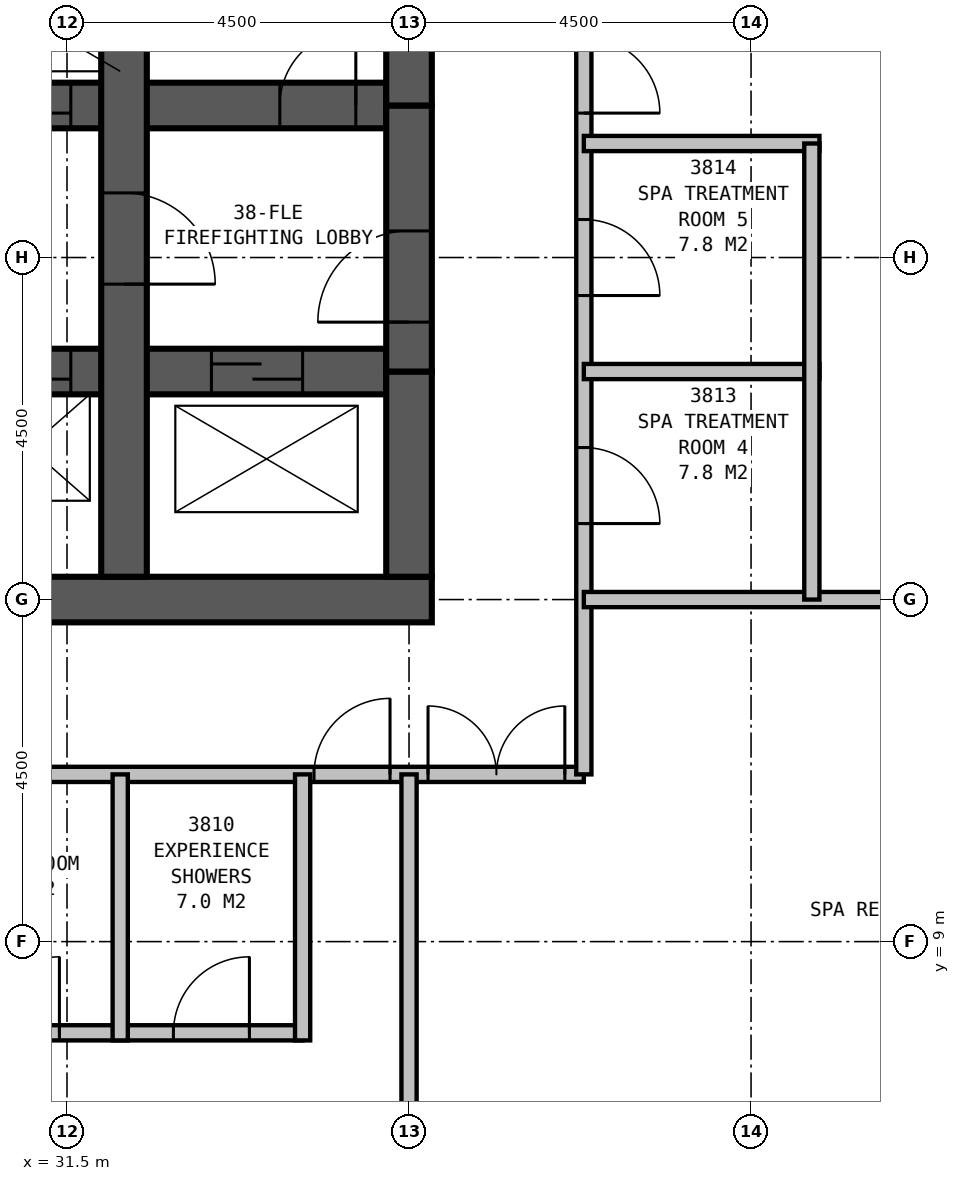
"""IFC4 building model, lengths in metres.
Left out: names, types, materials, properties, quantities, classifications, styles, units other than length and angle.
Written with IfcOpenShell. Run it as: python <this file> out.ifc"""

import sys

from ifc_helpers import new_model, si_unit, direction, frame, frame_2d, origin, place, context, subcontext, project, spatial, rectangle, extrude, element, fill, save


model = new_model("IFC4")
c1 = context("Model", 3, precision=1e-05, world=origin(), true_north=direction((0.0, 1.0)))
c2 = subcontext(c1, "Body", "Model", "MODEL_VIEW")
j1 = project(units=[si_unit("LENGTHUNIT", "METRE"), si_unit("PLANEANGLEUNIT", "RADIAN")], contexts=[c1])
p1 = place(None, origin())
s1 = spatial("IfcSite", under=j1, at=p1, CompositionType="ELEMENT")
p2 = place(p1, origin())
s2 = spatial("IfcBuilding", under=s1, at=p2, CompositionType="ELEMENT")
p3 = place(p2, frame((0.0, 0.0, 145.9)))
s3 = spatial("IfcBuildingStorey", under=s2, at=p3, CompositionType="ELEMENT", Elevation=145.9)
p4 = place(p3, frame((13.2, 13.5, 0.0), z_axis=(0.0, 0.0, 1.0), x_axis=(1.0, 0.0, 0.0)))
e1 = element("IfcWall", 1, at=p4, inside=s3, PredefinedType="SHEAR", context=c2, shape_type="SweptSolid", body=[
    extrude(rectangle(XDim=23.1, YDim=0.6, at=frame_2d((11.55, 0.0))), origin(), (0.0, 0.0, 1.0), 6.0),
])
p5 = place(p3, frame((32.25, 13.8, 0.0), z_axis=(0.0, 0.0, 1.0), x_axis=(0.0, 1.0, 0.0)))
e2 = element("IfcWall", 2, at=p5, inside=s3, PredefinedType="SHEAR", context=c2, shape_type="SweptSolid", body=[
    extrude(rectangle(XDim=12.9, YDim=0.6, at=frame_2d((6.45, 0.0))), origin(), (0.0, 0.0, 1.0), 6.0),
])
p6 = place(p5, frame((5.05, 0.0, 0.0), z_axis=(0.0, 0.0, 1.0), x_axis=(-1.0, 0.0, 0.0)))
e3 = element("IfcOpeningElement", 3, at=p6, cuts=e2, PredefinedType="OPENING", context=c2, shape_type="SweptSolid", body=[
    extrude(rectangle(XDim=1.2, YDim=2.1, at=frame_2d((0.6, 1.05))), frame((0.0, 0.31, 0.0), z_axis=(0.0, -1.0, 0.0), x_axis=(1.0, 0.0, 0.0)), (0.0, 0.0, 1.0), 0.62),
])
p7 = place(p3, frame((13.8, 16.5, 0.0), z_axis=(0.0, 0.0, 1.0), x_axis=(1.0, 0.0, 0.0)))
e4 = element("IfcWall", 4, at=p7, inside=s3, PredefinedType="SHEAR", context=c2, shape_type="SweptSolid", body=[
    extrude(rectangle(XDim=21.9, YDim=0.6, at=frame_2d((10.95, 0.0))), origin(), (0.0, 0.0, 1.0), 6.0),
])
p8 = place(p7, frame((11.65, 0.0, 0.0)))
e5 = element("IfcOpeningElement", 5, at=p8, cuts=e4, PredefinedType="OPENING", context=c2, shape_type="SweptSolid", body=[
    extrude(rectangle(XDim=1.1, YDim=2.1, at=frame_2d((0.55, 1.05))), frame((0.0, 0.31, 0.0), z_axis=(0.0, -1.0, 0.0), x_axis=(1.0, 0.0, 0.0)), (0.0, 0.0, 1.0), 0.62),
])
p9 = place(p7, frame((14.15, 0.0, 0.0)))
e6 = element("IfcOpeningElement", 6, at=p9, cuts=e4, PredefinedType="OPENING", context=c2, shape_type="SweptSolid", body=[
    extrude(rectangle(XDim=1.1, YDim=2.1, at=frame_2d((0.55, 1.05))), frame((0.0, 0.31, 0.0), z_axis=(0.0, -1.0, 0.0), x_axis=(1.0, 0.0, 0.0)), (0.0, 0.0, 1.0), 0.62),
])
p10 = place(p7, frame((16.65, 0.0, 0.0)))
e7 = element("IfcOpeningElement", 7, at=p10, cuts=e4, PredefinedType="OPENING", context=c2, shape_type="SweptSolid", body=[
    extrude(rectangle(XDim=1.1, YDim=2.1, at=frame_2d((0.55, 1.05))), frame((0.0, 0.31, 0.0), z_axis=(0.0, -1.0, 0.0), x_axis=(1.0, 0.0, 0.0)), (0.0, 0.0, 1.0), 0.62),
])
p11 = place(p7, frame((5.75, 0.0, 0.0), z_axis=(0.0, 0.0, 1.0), x_axis=(-1.0, 0.0, 0.0)))
e8 = element("IfcOpeningElement", 8, at=p11, cuts=e4, PredefinedType="OPENING", context=c2, shape_type="SweptSolid", body=[
    extrude(rectangle(XDim=1.0, YDim=2.1, at=frame_2d((0.5, 1.05))), frame((0.0, 0.31, 0.0), z_axis=(0.0, -1.0, 0.0), x_axis=(1.0, 0.0, 0.0)), (0.0, 0.0, 1.0), 0.62),
])
p12 = place(p7, frame((10.2, 0.0, 0.0), z_axis=(0.0, 0.0, 1.0), x_axis=(-1.0, 0.0, 0.0)))
e9 = element("IfcOpeningElement", 9, at=p12, cuts=e4, PredefinedType="OPENING", context=c2, shape_type="SweptSolid", body=[
    extrude(rectangle(XDim=1.0, YDim=2.1, at=frame_2d((0.5, 1.05))), frame((0.0, 0.31, 0.0), z_axis=(0.0, -1.0, 0.0), x_axis=(1.0, 0.0, 0.0)), (0.0, 0.0, 1.0), 0.62),
])
p13 = place(p7, frame((0.6, 0.0, 0.0)))
e10 = element("IfcOpeningElement", 10, at=p13, cuts=e4, PredefinedType="OPENING", context=c2, shape_type="SweptSolid", body=[
    extrude(rectangle(XDim=1.2, YDim=2.1, at=frame_2d((0.6, 1.05))), frame((0.0, 0.31, 0.0), z_axis=(0.0, -1.0, 0.0), x_axis=(1.0, 0.0, 0.0)), (0.0, 0.0, 1.0), 0.62),
])
p14 = place(p7, frame((19.6, 0.0, 0.0)))
e11 = element("IfcOpeningElement", 11, at=p14, cuts=e4, PredefinedType="OPENING", context=c2, shape_type="SweptSolid", body=[
    extrude(rectangle(XDim=1.2, YDim=2.1, at=frame_2d((0.6, 1.05))), frame((0.0, 0.31, 0.0), z_axis=(0.0, -1.0, 0.0), x_axis=(1.0, 0.0, 0.0)), (0.0, 0.0, 1.0), 0.62),
])
p15 = place(p3, frame((13.8, 20.0, 0.0), z_axis=(0.0, 0.0, 1.0), x_axis=(1.0, 0.0, 0.0)))
e12 = element("IfcWall", 12, at=p15, inside=s3, PredefinedType="SHEAR", context=c2, shape_type="SweptSolid", body=[
    extrude(rectangle(XDim=21.9, YDim=0.6, at=frame_2d((10.95, 0.0))), origin(), (0.0, 0.0, 1.0), 6.0),
])
p16 = place(p15, frame((0.5, 0.0, 0.0)))
e13 = element("IfcOpeningElement", 13, at=p16, cuts=e12, PredefinedType="OPENING", context=c2, shape_type="SweptSolid", body=[
    extrude(rectangle(XDim=1.0, YDim=2.1, at=frame_2d((0.5, 1.05))), frame((0.0, 0.31, 0.0), z_axis=(0.0, -1.0, 0.0), x_axis=(1.0, 0.0, 0.0)), (0.0, 0.0, 1.0), 0.62),
])
p17 = place(p15, frame((20.5, 0.0, 0.0)))
e14 = element("IfcOpeningElement", 14, at=p17, cuts=e12, PredefinedType="OPENING", context=c2, shape_type="SweptSolid", body=[
    extrude(rectangle(XDim=1.0, YDim=2.1, at=frame_2d((0.5, 1.05))), frame((0.0, 0.31, 0.0), z_axis=(0.0, -1.0, 0.0), x_axis=(1.0, 0.0, 0.0)), (0.0, 0.0, 1.0), 0.62),
])
p18 = place(p15, frame((4.15, 0.0, 0.0)))
e15 = element("IfcOpeningElement", 15, at=p18, cuts=e12, PredefinedType="OPENING", context=c2, shape_type="SweptSolid", body=[
    extrude(rectangle(XDim=1.1, YDim=2.1, at=frame_2d((0.55, 1.05))), frame((0.0, 0.31, 0.0), z_axis=(0.0, -1.0, 0.0), x_axis=(1.0, 0.0, 0.0)), (0.0, 0.0, 1.0), 0.62),
])
p19 = place(p15, frame((6.65, 0.0, 0.0)))
e16 = element("IfcOpeningElement", 16, at=p19, cuts=e12, PredefinedType="OPENING", context=c2, shape_type="SweptSolid", body=[
    extrude(rectangle(XDim=1.1, YDim=2.1, at=frame_2d((0.55, 1.05))), frame((0.0, 0.31, 0.0), z_axis=(0.0, -1.0, 0.0), x_axis=(1.0, 0.0, 0.0)), (0.0, 0.0, 1.0), 0.62),
])
p20 = place(p15, frame((9.15, 0.0, 0.0)))
e17 = element("IfcOpeningElement", 17, at=p20, cuts=e12, PredefinedType="OPENING", context=c2, shape_type="SweptSolid", body=[
    extrude(rectangle(XDim=1.1, YDim=2.1, at=frame_2d((0.55, 1.05))), frame((0.0, 0.31, 0.0), z_axis=(0.0, -1.0, 0.0), x_axis=(1.0, 0.0, 0.0)), (0.0, 0.0, 1.0), 0.62),
])
p21 = place(p15, frame((11.65, 0.0, 0.0)))
e18 = element("IfcOpeningElement", 18, at=p21, cuts=e12, PredefinedType="OPENING", context=c2, shape_type="SweptSolid", body=[
    extrude(rectangle(XDim=1.1, YDim=2.1, at=frame_2d((0.55, 1.05))), frame((0.0, 0.31, 0.0), z_axis=(0.0, -1.0, 0.0), x_axis=(1.0, 0.0, 0.0)), (0.0, 0.0, 1.0), 0.62),
])
p22 = place(p15, frame((14.15, 0.0, 0.0)))
e19 = element("IfcOpeningElement", 19, at=p22, cuts=e12, PredefinedType="OPENING", context=c2, shape_type="SweptSolid", body=[
    extrude(rectangle(XDim=1.1, YDim=2.1, at=frame_2d((0.55, 1.05))), frame((0.0, 0.31, 0.0), z_axis=(0.0, -1.0, 0.0), x_axis=(1.0, 0.0, 0.0)), (0.0, 0.0, 1.0), 0.62),
])
p23 = place(p15, frame((16.65, 0.0, 0.0)))
e20 = element("IfcOpeningElement", 20, at=p23, cuts=e12, PredefinedType="OPENING", context=c2, shape_type="SweptSolid", body=[
    extrude(rectangle(XDim=1.1, YDim=2.1, at=frame_2d((0.55, 1.05))), frame((0.0, 0.31, 0.0), z_axis=(0.0, -1.0, 0.0), x_axis=(1.0, 0.0, 0.0)), (0.0, 0.0, 1.0), 0.62),
])
p24 = place(p3, frame((36.0, 13.8, 0.0), z_axis=(0.0, 0.0, 1.0), x_axis=(0.0, 1.0, 0.0)))
e21 = element("IfcWall", 21, at=p24, inside=s3, PredefinedType="SHEAR", context=c2, shape_type="SweptSolid", body=[
    extrude(rectangle(XDim=2.7, YDim=0.6, at=frame_2d((1.35, 0.0))), origin(), (0.0, 0.0, 1.0), 6.0),
])
p25 = place(p3, frame((36.0, 16.5, 0.0), z_axis=(0.0, 0.0, 1.0), x_axis=(0.0, 1.0, 0.0)))
e22 = element("IfcWall", 22, at=p25, inside=s3, PredefinedType="SHEAR", context=c2, shape_type="SweptSolid", body=[
    extrude(rectangle(XDim=3.5, YDim=0.6, at=frame_2d((1.75, 0.0))), origin(), (0.0, 0.0, 1.0), 6.0),
])
p26 = place(p25, frame((0.65, 0.0, 0.0)))
e23 = element("IfcOpeningElement", 23, at=p26, cuts=e22, PredefinedType="OPENING", context=c2, shape_type="SweptSolid", body=[
    extrude(rectangle(XDim=1.2, YDim=2.1, at=frame_2d((0.6, 1.05))), frame((0.0, 0.31, 0.0), z_axis=(0.0, -1.0, 0.0), x_axis=(1.0, 0.0, 0.0)), (0.0, 0.0, 1.0), 0.62),
])
p27 = place(p3, frame((36.0, 20.0, 0.0), z_axis=(0.0, 0.0, 1.0), x_axis=(0.0, 1.0, 0.0)))
e24 = element("IfcWall", 24, at=p27, inside=s3, PredefinedType="SHEAR", context=c2, shape_type="SweptSolid", body=[
    extrude(rectangle(XDim=6.7, YDim=0.6, at=frame_2d((3.35, 0.0))), origin(), (0.0, 0.0, 1.0), 6.0),
])
p28 = place(p3, frame((11.2, 11.2, 0.0), z_axis=(0.0, 0.0, 1.0), x_axis=(1.0, 0.0, 0.0)))
e25 = element("IfcWall", 25, at=p28, inside=s3, PredefinedType="PARTITIONING", context=c2, shape_type="SweptSolid", body=[
    extrude(rectangle(XDim=27.1, YDim=0.2, at=frame_2d((13.55, 0.0))), origin(), (0.0, 0.0, 1.0), 5.7),
])
p29 = place(p28, frame((11.75, 0.0, 0.0)))
e26 = element("IfcOpeningElement", 26, at=p29, cuts=e25, PredefinedType="OPENING", context=c2, shape_type="SweptSolid", body=[
    extrude(rectangle(XDim=1.0, YDim=2.1, at=frame_2d((0.5, 1.05))), frame((0.0, 0.11, 0.0), z_axis=(0.0, -1.0, 0.0), x_axis=(1.0, 0.0, 0.0)), (0.0, 0.0, 1.0), 0.22),
])
p30 = place(p28, frame((23.55, 0.0, 0.0)))
e27 = element("IfcOpeningElement", 27, at=p30, cuts=e25, PredefinedType="OPENING", context=c2, shape_type="SweptSolid", body=[
    extrude(rectangle(XDim=1.0, YDim=2.1, at=frame_2d((0.5, 1.05))), frame((0.0, 0.11, 0.0), z_axis=(0.0, -1.0, 0.0), x_axis=(1.0, 0.0, 0.0)), (0.0, 0.0, 1.0), 0.22),
])
p31 = place(p28, frame((0.25, 0.0, 0.0)))
e28 = element("IfcOpeningElement", 28, at=p31, cuts=e25, PredefinedType="OPENING", context=c2, shape_type="SweptSolid", body=[
    extrude(rectangle(XDim=1.8, YDim=2.4, at=frame_2d((0.9, 1.2))), frame((0.0, 0.11, 0.0), z_axis=(0.0, -1.0, 0.0), x_axis=(1.0, 0.0, 0.0)), (0.0, 0.0, 1.0), 0.22),
])
p32 = place(p28, frame((25.05, 0.0, 0.0)))
e29 = element("IfcOpeningElement", 29, at=p32, cuts=e25, PredefinedType="OPENING", context=c2, shape_type="SweptSolid", body=[
    extrude(rectangle(XDim=1.8, YDim=2.4, at=frame_2d((0.9, 1.2))), frame((0.0, 0.11, 0.0), z_axis=(0.0, -1.0, 0.0), x_axis=(1.0, 0.0, 0.0)), (0.0, 0.0, 1.0), 0.22),
])
p33 = place(p3, frame((38.3, 11.2, 0.0), z_axis=(0.0, 0.0, 1.0), x_axis=(0.0, 1.0, 0.0)))
e30 = element("IfcWall", 30, at=p33, inside=s3, PredefinedType="PARTITIONING", context=c2, shape_type="SweptSolid", body=[
    extrude(rectangle(XDim=18.1, YDim=0.2, at=frame_2d((9.05, 0.0))), origin(), (0.0, 0.0, 1.0), 5.7),
])
p34 = place(p33, frame((4.3, 0.0, 0.0), z_axis=(0.0, 0.0, 1.0), x_axis=(-1.0, 0.0, 0.0)))
e31 = element("IfcOpeningElement", 31, at=p34, cuts=e30, PredefinedType="OPENING", context=c2, shape_type="SweptSolid", body=[
    extrude(rectangle(XDim=1.0, YDim=2.1, at=frame_2d((0.5, 1.05))), frame((0.0, 0.11, 0.0), z_axis=(0.0, -1.0, 0.0), x_axis=(1.0, 0.0, 0.0)), (0.0, 0.0, 1.0), 0.22),
])
p35 = place(p33, frame((7.3, 0.0, 0.0), z_axis=(0.0, 0.0, 1.0), x_axis=(-1.0, 0.0, 0.0)))
e32 = element("IfcOpeningElement", 32, at=p35, cuts=e30, PredefinedType="OPENING", context=c2, shape_type="SweptSolid", body=[
    extrude(rectangle(XDim=1.0, YDim=2.1, at=frame_2d((0.5, 1.05))), frame((0.0, 0.11, 0.0), z_axis=(0.0, -1.0, 0.0), x_axis=(1.0, 0.0, 0.0)), (0.0, 0.0, 1.0), 0.22),
])
p36 = place(p33, frame((9.7, 0.0, 0.0), z_axis=(0.0, 0.0, 1.0), x_axis=(-1.0, 0.0, 0.0)))
e33 = element("IfcOpeningElement", 33, at=p36, cuts=e30, PredefinedType="OPENING", context=c2, shape_type="SweptSolid", body=[
    extrude(rectangle(XDim=1.0, YDim=2.1, at=frame_2d((0.5, 1.05))), frame((0.0, 0.11, 0.0), z_axis=(0.0, -1.0, 0.0), x_axis=(1.0, 0.0, 0.0)), (0.0, 0.0, 1.0), 0.22),
])
p37 = place(p33, frame((12.75, 0.0, 0.0), z_axis=(0.0, 0.0, 1.0), x_axis=(-1.0, 0.0, 0.0)))
e34 = element("IfcOpeningElement", 34, at=p37, cuts=e30, PredefinedType="OPENING", context=c2, shape_type="SweptSolid", body=[
    extrude(rectangle(XDim=1.0, YDim=2.1, at=frame_2d((0.5, 1.05))), frame((0.0, 0.11, 0.0), z_axis=(0.0, -1.0, 0.0), x_axis=(1.0, 0.0, 0.0)), (0.0, 0.0, 1.0), 0.22),
])
p38 = place(p3, frame((36.0, 11.2, 0.0), z_axis=(0.0, 0.0, 1.0), x_axis=(0.0, -1.0, 0.0)))
e35 = element("IfcWall", 35, at=p38, inside=s3, PredefinedType="PARTITIONING", context=c2, shape_type="SweptSolid", body=[
    extrude(rectangle(XDim=10.15, YDim=0.2, at=frame_2d((5.075, 0.0))), origin(), (0.0, 0.0, 1.0), 4.7),
])
p39 = place(p3, frame((38.3, 13.5, 0.0), z_axis=(0.0, 0.0, 1.0), x_axis=(1.0, 0.0, 0.0)))
e36 = element("IfcWall", 36, at=p39, inside=s3, PredefinedType="PARTITIONING", context=c2, shape_type="SweptSolid", body=[
    extrude(rectangle(XDim=8.639, YDim=0.2, at=frame_2d((4.32, 0.0))), origin(), (0.0, 0.0, 1.0), 4.4),
])
p40 = place(p3, frame((32.2, 11.2, 0.0), z_axis=(0.0, 0.0, 1.0), x_axis=(0.0, -1.0, 0.0)))
e37 = element("IfcWall", 37, at=p40, inside=s3, PredefinedType="PARTITIONING", context=c2, shape_type="SweptSolid", body=[
    extrude(rectangle(XDim=3.5, YDim=0.2, at=frame_2d((1.75, 0.0))), origin(), (0.0, 0.0, 1.0), 4.7),
])
p41 = place(p3, frame((34.6, 11.2, 0.0), z_axis=(0.0, 0.0, 1.0), x_axis=(0.0, -1.0, 0.0)))
e38 = element("IfcWall", 38, at=p41, inside=s3, PredefinedType="PARTITIONING", context=c2, shape_type="SweptSolid", body=[
    extrude(rectangle(XDim=3.5, YDim=0.2, at=frame_2d((1.75, 0.0))), origin(), (0.0, 0.0, 1.0), 5.7),
])
p42 = place(p3, frame((27.0, 7.8, 0.0), z_axis=(0.0, 0.0, 1.0), x_axis=(1.0, 0.0, 0.0)))
e39 = element("IfcWall", 39, at=p42, inside=s3, PredefinedType="PARTITIONING", context=c2, shape_type="SweptSolid", body=[
    extrude(rectangle(XDim=7.6, YDim=0.2, at=frame_2d((3.8, 0.0))), origin(), (0.0, 0.0, 1.0), 5.7),
])
p43 = place(p42, frame((0.8, 0.0, 0.0)))
e40 = element("IfcOpeningElement", 40, at=p43, cuts=e39, PredefinedType="OPENING", context=c2, shape_type="SweptSolid", body=[
    extrude(rectangle(XDim=1.0, YDim=2.1, at=frame_2d((0.5, 1.05))), frame((0.0, 0.11, 0.0), z_axis=(0.0, -1.0, 0.0), x_axis=(1.0, 0.0, 0.0)), (0.0, 0.0, 1.0), 0.22),
])
p44 = place(p42, frame((3.4, 0.0, 0.0)))
e41 = element("IfcOpeningElement", 41, at=p44, cuts=e39, PredefinedType="OPENING", context=c2, shape_type="SweptSolid", body=[
    extrude(rectangle(XDim=1.0, YDim=2.1, at=frame_2d((0.5, 1.05))), frame((0.0, 0.11, 0.0), z_axis=(0.0, -1.0, 0.0), x_axis=(1.0, 0.0, 0.0)), (0.0, 0.0, 1.0), 0.22),
])
p45 = place(p42, frame((5.9, 0.0, 0.0)))
e42 = element("IfcOpeningElement", 42, at=p45, cuts=e39, PredefinedType="OPENING", context=c2, shape_type="SweptSolid", body=[
    extrude(rectangle(XDim=1.0, YDim=2.1, at=frame_2d((0.5, 1.05))), frame((0.0, 0.11, 0.0), z_axis=(0.0, -1.0, 0.0), x_axis=(1.0, 0.0, 0.0)), (0.0, 0.0, 1.0), 0.22),
])
for number, where, z_axis, x_axis in (
    (43, (38.3, 16.5, 0.0), (0.0, 0.0, 1.0), (1.0, 0.0, 0.0)),
    (44, (38.3, 19.5, 0.0), (0.0, 0.0, 1.0), (1.0, 0.0, 0.0)),
):
    element("IfcWall", number, at=place(p3, frame(where, z_axis=z_axis, x_axis=x_axis)), inside=s3, PredefinedType="PARTITIONING", context=c2, shape_type="SweptSolid", body=[
        extrude(rectangle(XDim=3.1, YDim=0.2, at=frame_2d((1.55, 0.0))), origin(), (0.0, 0.0, 1.0), 5.7),
    ])
p46 = place(p3, frame((41.3, 13.5, 0.0), z_axis=(0.0, 0.0, 1.0), x_axis=(0.0, 1.0, 0.0)))
e45 = element("IfcWall", 45, at=p46, inside=s3, PredefinedType="PARTITIONING", context=c2, shape_type="SweptSolid", body=[
    extrude(rectangle(XDim=6.0, YDim=0.2, at=frame_2d((3.0, 0.0))), origin(), (0.0, 0.0, 1.0), 5.7),
])
p47 = place(p30, origin())
e46 = element("IfcDoor", 46, at=p47, inside=s3, OperationType="SINGLE_SWING_RIGHT", PredefinedType="DOOR", context=c2, shape_type="SweptSolid", body=[
    extrude(rectangle(XDim=1.0, YDim=2.1, at=frame_2d((0.5, 1.05))), frame((0.0, 0.025, 0.0), z_axis=(0.0, -1.0, 0.0), x_axis=(1.0, 0.0, 0.0)), (0.0, 0.0, 1.0), 0.05),
])
fill(e27, e46)
p48 = place(p32, origin())
e47 = element("IfcDoor", 47, at=p48, inside=s3, OperationType="DOUBLE_DOOR_SINGLE_SWING", PredefinedType="DOOR", context=c2, shape_type="SweptSolid", body=[
    extrude(rectangle(XDim=1.8, YDim=2.4, at=frame_2d((0.9, 1.2))), frame((0.0, 0.025, 0.0), z_axis=(0.0, -1.0, 0.0), x_axis=(1.0, 0.0, 0.0)), (0.0, 0.0, 1.0), 0.05),
])
fill(e29, e47)
p49 = place(p34, origin())
e48 = element("IfcDoor", 48, at=p49, inside=s3, OperationType="SINGLE_SWING_RIGHT", PredefinedType="DOOR", context=c2, shape_type="SweptSolid", body=[
    extrude(rectangle(XDim=1.0, YDim=2.1, at=frame_2d((0.5, 1.05))), frame((0.0, 0.025, 0.0), z_axis=(0.0, -1.0, 0.0), x_axis=(1.0, 0.0, 0.0)), (0.0, 0.0, 1.0), 0.05),
])
fill(e31, e48)
p50 = place(p35, origin())
e49 = element("IfcDoor", 49, at=p50, inside=s3, OperationType="SINGLE_SWING_RIGHT", PredefinedType="DOOR", context=c2, shape_type="SweptSolid", body=[
    extrude(rectangle(XDim=1.0, YDim=2.1, at=frame_2d((0.5, 1.05))), frame((0.0, 0.025, 0.0), z_axis=(0.0, -1.0, 0.0), x_axis=(1.0, 0.0, 0.0)), (0.0, 0.0, 1.0), 0.05),
])
fill(e32, e49)
p51 = place(p36, origin())
e50 = element("IfcDoor", 50, at=p51, inside=s3, OperationType="SINGLE_SWING_RIGHT", PredefinedType="DOOR", context=c2, shape_type="SweptSolid", body=[
    extrude(rectangle(XDim=1.0, YDim=2.1, at=frame_2d((0.5, 1.05))), frame((0.0, 0.025, 0.0), z_axis=(0.0, -1.0, 0.0), x_axis=(1.0, 0.0, 0.0)), (0.0, 0.0, 1.0), 0.05),
])
fill(e33, e50)
p52 = place(p44, origin())
e51 = element("IfcDoor", 51, at=p52, inside=s3, OperationType="SINGLE_SWING_RIGHT", PredefinedType="DOOR", context=c2, shape_type="SweptSolid", body=[
    extrude(rectangle(XDim=1.0, YDim=2.1, at=frame_2d((0.5, 1.05))), frame((0.0, 0.025, 0.0), z_axis=(0.0, -1.0, 0.0), x_axis=(1.0, 0.0, 0.0)), (0.0, 0.0, 1.0), 0.05),
])
fill(e41, e51)
p53 = place(p45, origin())
e52 = element("IfcDoor", 52, at=p53, inside=s3, OperationType="SINGLE_SWING_RIGHT", PredefinedType="DOOR", context=c2, shape_type="SweptSolid", body=[
    extrude(rectangle(XDim=1.0, YDim=2.1, at=frame_2d((0.5, 1.05))), frame((0.0, 0.025, 0.0), z_axis=(0.0, -1.0, 0.0), x_axis=(1.0, 0.0, 0.0)), (0.0, 0.0, 1.0), 0.05),
])
fill(e42, e52)
p54 = place(p26, origin())
e53 = element("IfcDoor", 53, at=p54, inside=s3, OperationType="SINGLE_SWING_LEFT", PredefinedType="DOOR", context=c2, shape_type="SweptSolid", body=[
    extrude(rectangle(XDim=1.2, YDim=2.1, at=frame_2d((0.6, 1.05))), frame((0.0, 0.3, 0.0), z_axis=(0.0, -1.0, 0.0), x_axis=(1.0, 0.0, 0.0)), (0.0, 0.0, 1.0), 0.6),
])
fill(e23, e53)
p55 = place(p6, origin())
e54 = element("IfcDoor", 54, at=p55, inside=s3, OperationType="SINGLE_SWING_RIGHT", PredefinedType="DOOR", context=c2, shape_type="SweptSolid", body=[
    extrude(rectangle(XDim=1.2, YDim=2.1, at=frame_2d((0.6, 1.05))), frame((0.0, 0.3, 0.0), z_axis=(0.0, -1.0, 0.0), x_axis=(1.0, 0.0, 0.0)), (0.0, 0.0, 1.0), 0.6),
])
fill(e3, e54)
p56 = place(p17, origin())
e55 = element("IfcDoor", 55, at=p56, inside=s3, OperationType="SINGLE_SWING_RIGHT", PredefinedType="DOOR", context=c2, shape_type="SweptSolid", body=[
    extrude(rectangle(XDim=1.0, YDim=2.1, at=frame_2d((0.5, 1.05))), frame((0.0, 0.3, 0.0), z_axis=(0.0, -1.0, 0.0), x_axis=(1.0, 0.0, 0.0)), (0.0, 0.0, 1.0), 0.6),
])
fill(e14, e55)
p57 = place(p10, origin())
e56 = element("IfcDoor", 56, at=p57, inside=s3, OperationType="SLIDING_TO_LEFT", PredefinedType="DOOR", context=c2, shape_type="SweptSolid", body=[
    extrude(rectangle(XDim=1.1, YDim=2.1, at=frame_2d((0.55, 1.05))), frame((0.0, 0.3, 0.0), z_axis=(0.0, -1.0, 0.0), x_axis=(1.0, 0.0, 0.0)), (0.0, 0.0, 1.0), 0.6),
])
fill(e7, e56)
p58 = place(p23, origin())
e57 = element("IfcDoor", 57, at=p58, inside=s3, OperationType="SLIDING_TO_LEFT", PredefinedType="DOOR", context=c2, shape_type="SweptSolid", body=[
    extrude(rectangle(XDim=1.1, YDim=2.1, at=frame_2d((0.55, 1.05))), frame((0.0, 0.3, 0.0), z_axis=(0.0, -1.0, 0.0), x_axis=(1.0, 0.0, 0.0)), (0.0, 0.0, 1.0), 0.6),
])
fill(e20, e57)
p59 = place(p14, origin())
e58 = element("IfcDoor", 58, at=p59, inside=s3, OperationType="SLIDING_TO_LEFT", PredefinedType="DOOR", context=c2, shape_type="SweptSolid", body=[
    extrude(rectangle(XDim=1.2, YDim=2.1, at=frame_2d((0.6, 1.05))), frame((0.0, 0.3, 0.0), z_axis=(0.0, -1.0, 0.0), x_axis=(1.0, 0.0, 0.0)), (0.0, 0.0, 1.0), 0.6),
])
fill(e11, e58)
save(model, sys.argv[1])
